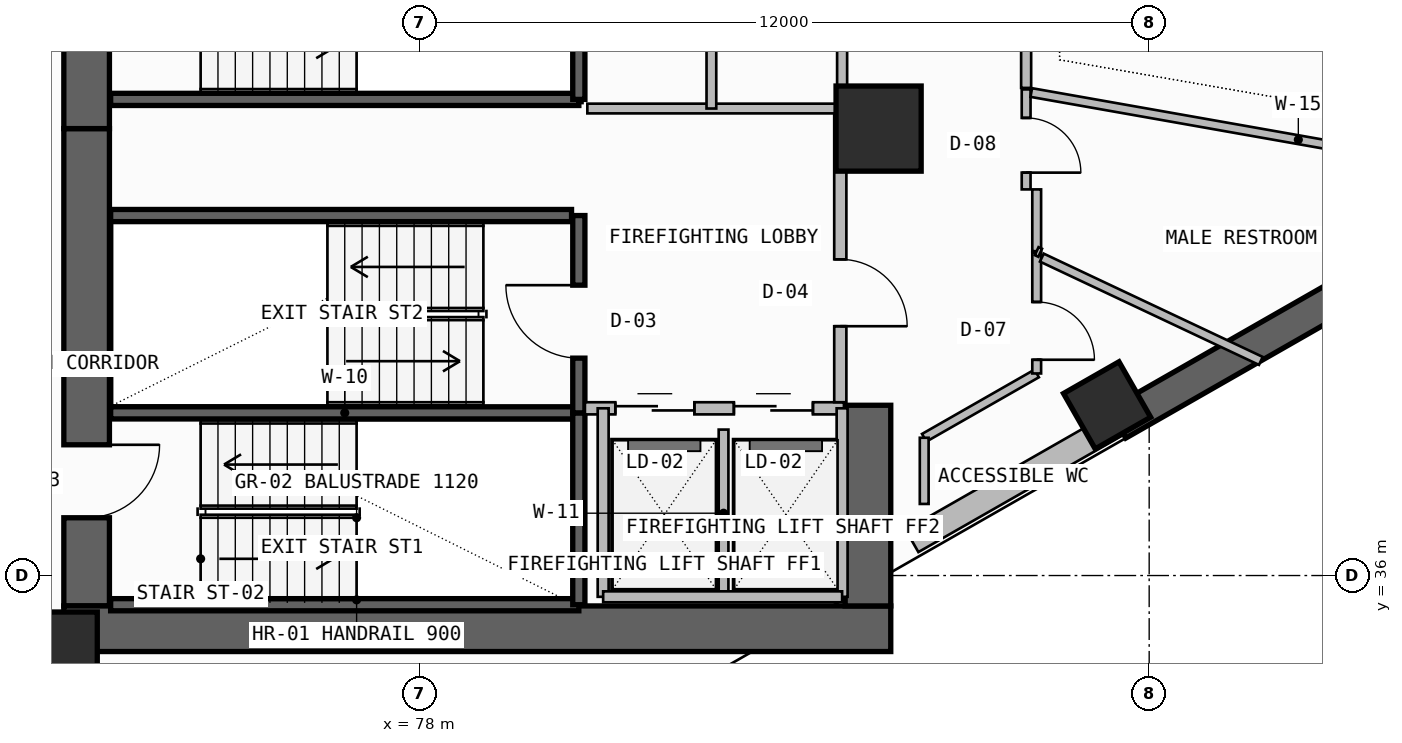
"""IFC4 building model, lengths in metres.
Left out: names, types, materials, properties, quantities, classifications, styles, units other than length and angle.
Written with IfcOpenShell. Run it as: python <this file> out.ifc"""

import sys

from ifc_helpers import new_model, si_unit, direction, frame, frame_2d, origin, origin_2d, place, context, subcontext, project, spatial, rectangle, extrude, element, fill, save


model = new_model("IFC4")
c1 = context("Model", 3, precision=1e-05, world=origin(), true_north=direction((0.0, 1.0)))
c2 = subcontext(c1, "Body", "Model", "MODEL_VIEW")
j1 = project(units=[si_unit("LENGTHUNIT", "METRE"), si_unit("PLANEANGLEUNIT", "RADIAN")], contexts=[c1])
p1 = place(None, origin())
s1 = spatial("IfcSite", under=j1, at=p1, CompositionType="ELEMENT")
p2 = place(p1, origin())
s2 = spatial("IfcBuilding", under=s1, at=p2, CompositionType="ELEMENT")
p3 = place(p2, frame((0.0, 0.0, 207.94)))
s3 = spatial("IfcBuildingStorey", under=s2, at=p3, CompositionType="ELEMENT", Elevation=207.94)
p4 = place(p3, frame((72.525, 35.5, -0.26), z_axis=(0.0, 0.0, 1.0), x_axis=(0.0, 1.0, 0.0)))
e1 = element("IfcWall", 1, at=p4, inside=s3, PredefinedType="SHEAR", context=c2, shape_type="SweptSolid", body=[
    extrude(rectangle(XDim=7.85, YDim=0.75, at=frame_2d((3.925, 0.0))), origin(), (0.0, 0.0, 1.0), 3.52),
])
p5 = place(p4, frame((1.45, 0.0, 0.26)))
e2 = element("IfcOpeningElement", 2, at=p5, cuts=e1, PredefinedType="OPENING", context=c2, shape_type="SweptSolid", body=[
    extrude(rectangle(XDim=1.2, YDim=2.2, at=frame_2d((0.6, 1.1))), frame((0.0, 0.385, 0.0), z_axis=(0.0, -1.0, 0.0), x_axis=(1.0, 0.0, 0.0)), (0.0, 0.0, 1.0), 0.77),
])
p6 = place(p3, frame((72.15, 35.125, -0.26), z_axis=(0.0, 0.0, 1.0), x_axis=(1.0, 0.0, 0.0)))
e3 = element("IfcWall", 3, at=p6, inside=s3, PredefinedType="SHEAR", context=c2, shape_type="SweptSolid", body=[
    extrude(rectangle(XDim=13.6, YDim=0.75, at=frame_2d((6.8, 0.0))), origin(), (0.0, 0.0, 1.0), 3.52),
])
p7 = place(p3, frame((85.375, 35.5, -0.26), z_axis=(0.0, 0.0, 1.0), x_axis=(0.0, 1.0, 0.0)))
e4 = element("IfcWall", 4, at=p7, inside=s3, PredefinedType="SHEAR", context=c2, shape_type="SweptSolid", body=[
    extrude(rectangle(XDim=3.3, YDim=0.75, at=frame_2d((1.65, 0.0))), origin(), (0.0, 0.0, 1.0), 3.52),
])
p8 = place(p3, frame((72.525, 43.35, -0.26), z_axis=(0.0, 0.0, 1.0), x_axis=(0.0, 1.0, 0.0)))
e5 = element("IfcWall", 5, at=p8, inside=s3, PredefinedType="SHEAR", context=c2, shape_type="SweptSolid", body=[
    extrude(rectangle(XDim=12.7, YDim=0.75, at=frame_2d((6.35, 0.0))), origin(), (0.0, 0.0, 1.0), 3.52),
])
p9 = place(p8, frame((1.35, 0.0, 0.26)))
e6 = element("IfcOpeningElement", 6, at=p9, cuts=e5, PredefinedType="OPENING", context=c2, shape_type="SweptSolid", body=[
    extrude(rectangle(XDim=1.2, YDim=2.2, at=frame_2d((0.6, 1.1))), frame((0.0, 0.385, 0.0), z_axis=(0.0, -1.0, 0.0), x_axis=(1.0, 0.0, 0.0)), (0.0, 0.0, 1.0), 0.77),
])
for number, where, z_axis, x_axis in (
    (7, (72.0, 34.7, 0.0), (0.0, 0.0, 1.0), (1.0, 0.0, 0.0)),
    (8, (85.55, 43.35, 0.0), (0.0, 0.0, 1.0), (1.0, 0.0, 0.0)),
):
    element("IfcColumn", number, at=place(p3, frame(where, z_axis=z_axis, x_axis=x_axis)), inside=s3, PredefinedType="COLUMN", context=c2, shape_type="SweptSolid", body=[
        extrude(rectangle(XDim=1.4, YDim=1.4, at=origin_2d()), origin(), (0.0, 0.0, 1.0), 3.52),
    ])
p10 = place(p3, frame((89.308, 38.799, 0.0), z_axis=(0.0, 0.0, 1.0), x_axis=(0.868198814489, 0.496216503675, 0.0)))
e9 = element("IfcColumn", 9, at=p10, inside=s3, PredefinedType="COLUMN", context=c2, shape_type="SweptSolid", body=[
    extrude(rectangle(XDim=1.05, YDim=1.05, at=origin_2d()), origin(), (0.0, 0.0, 1.0), 3.52),
])
p11 = place(p3, frame((86.1, 36.568, 0.0), z_axis=(0.0, 0.0, 1.0), x_axis=(0.868192956745, 0.496226752461, 0.0)))
e10 = element("IfcWall", 10, at=p11, inside=s3, PredefinedType="SOLIDWALL", context=c2, shape_type="SweptSolid", body=[
    extrude(rectangle(XDim=3.892, YDim=0.42, at=frame_2d((1.946, 0.0))), origin(), (0.0, 0.0, 1.0), 2.245),
])
p12 = place(p3, frame((89.479, 38.499, -0.26), z_axis=(0.0, 0.0, 1.0), x_axis=(0.868197136736, 0.496219439123, 0.0)))
e11 = element("IfcWall", 11, at=p12, inside=s3, PredefinedType="SHEAR", context=c2, shape_type="SweptSolid", body=[
    extrude(rectangle(XDim=17.636, YDim=0.55, at=frame_2d((8.818, 0.0))), origin(), (0.0, 0.0, 1.0), 3.52),
])
p13 = place(p12, frame((11.464, 0.0, 1.1)))
e12 = element("IfcOpeningElement", 12, at=p13, cuts=e11, PredefinedType="OPENING", context=c2, shape_type="SweptSolid", body=[
    extrude(rectangle(XDim=2.4, YDim=1.2, at=frame_2d((1.2, 0.6))), frame((0.0, 0.285, 0.0), z_axis=(0.0, -1.0, 0.0), x_axis=(1.0, 0.0, 0.0)), (0.0, 0.0, 1.0), 0.57),
])
for number, where, z_axis, x_axis in (
    (13, (72.92, 35.52, -0.26), (0.0, 0.0, 1.0), (1.0, 0.0, 0.0)),
    (14, (72.92, 38.675, -0.26), (0.0, 0.0, 1.0), (1.0, 0.0, 0.0)),
):
    element("IfcWall", number, at=place(p3, frame(where, z_axis=z_axis, x_axis=x_axis)), inside=s3, PredefinedType="SOLIDWALL", context=c2, shape_type="SweptSolid", body=[
        extrude(rectangle(XDim=7.7, YDim=0.2, at=frame_2d((3.85, 0.0))), origin(), (0.0, 0.0, 1.0), 3.52),
    ])
p14 = place(p3, frame((80.62, 35.52, -0.26), z_axis=(0.0, 0.0, 1.0), x_axis=(0.0, 1.0, 0.0)))
e15 = element("IfcWall", 15, at=p14, inside=s3, PredefinedType="SOLIDWALL", context=c2, shape_type="SweptSolid", body=[
    extrude(rectangle(XDim=3.155, YDim=0.2, at=frame_2d((1.578, 0.0))), origin(), (0.0, 0.0, 1.0), 3.52),
])
p15 = place(p3, frame((80.62, 38.675, -0.26), z_axis=(0.0, 0.0, 1.0), x_axis=(0.0, 1.0, 0.0)))
e16 = element("IfcWall", 16, at=p15, inside=s3, PredefinedType="SOLIDWALL", context=c2, shape_type="SweptSolid", body=[
    extrude(rectangle(XDim=3.245, YDim=0.2, at=frame_2d((1.623, 0.0))), origin(), (0.0, 0.0, 1.0), 3.52),
])
p16 = place(p15, frame((0.9, 0.0, 0.26)))
e17 = element("IfcOpeningElement", 17, at=p16, cuts=e16, PredefinedType="OPENING", context=c2, shape_type="SweptSolid", body=[
    extrude(rectangle(XDim=1.2, YDim=2.2, at=frame_2d((0.6, 1.1))), frame((0.0, 0.11, 0.0), z_axis=(0.0, -1.0, 0.0), x_axis=(1.0, 0.0, 0.0)), (0.0, 0.0, 1.0), 0.22),
])
p17 = place(p3, frame((80.72, 38.75, 0.0), z_axis=(0.0, 0.0, 1.0), x_axis=(1.0, 0.0, 0.0)))
e18 = element("IfcWall", 18, at=p17, inside=s3, PredefinedType="SOLIDWALL", context=c2, shape_type="SweptSolid", body=[
    extrude(rectangle(XDim=4.26, YDim=0.2, at=frame_2d((2.13, 0.0))), origin(), (0.0, 0.0, 1.0), 3.26),
])
p18 = place(p17, frame((0.5, 0.0, 0.0)))
e19 = element("IfcOpeningElement", 19, at=p18, cuts=e18, PredefinedType="OPENING", context=c2, shape_type="SweptSolid", body=[
    extrude(rectangle(XDim=1.3, YDim=2.3, at=frame_2d((0.65, 1.15))), frame((0.0, 0.11, 0.0), z_axis=(0.0, -1.0, 0.0), x_axis=(1.0, 0.0, 0.0)), (0.0, 0.0, 1.0), 0.22),
])
p19 = place(p17, frame((2.45, 0.0, 0.0)))
e20 = element("IfcOpeningElement", 20, at=p19, cuts=e18, PredefinedType="OPENING", context=c2, shape_type="SweptSolid", body=[
    extrude(rectangle(XDim=1.3, YDim=2.3, at=frame_2d((0.65, 1.15))), frame((0.0, 0.11, 0.0), z_axis=(0.0, -1.0, 0.0), x_axis=(1.0, 0.0, 0.0)), (0.0, 0.0, 1.0), 0.22),
])
p20 = place(p3, frame((83.0, 35.65, 0.0), z_axis=(0.0, 0.0, 1.0), x_axis=(0.0, 1.0, 0.0)))
e21 = element("IfcWall", 21, at=p20, inside=s3, PredefinedType="PLUMBINGWALL", context=c2, shape_type="SweptSolid", body=[
    extrude(rectangle(XDim=2.75, YDim=0.16, at=frame_2d((1.375, 0.0))), origin(), (0.0, 0.0, 1.0), 3.26),
])
for number, where, z_axis, x_axis in (
    (22, (84.95, 35.65, 0.0), (0.0, 0.0, 1.0), (0.0, 1.0, 0.0)),
    (23, (81.02, 35.65, 0.0), (0.0, 0.0, 1.0), (0.0, 1.0, 0.0)),
):
    element("IfcWall", number, at=place(p3, frame(where, z_axis=z_axis, x_axis=x_axis)), inside=s3, PredefinedType="SOLIDWALL", context=c2, shape_type="SweptSolid", body=[
        extrude(rectangle(XDim=3.1, YDim=0.18, at=frame_2d((1.55, 0.0))), origin(), (0.0, 0.0, 1.0), 3.26),
    ])
p21 = place(p3, frame((81.02, 35.65, 0.0), z_axis=(0.0, 0.0, 1.0), x_axis=(1.0, 0.0, 0.0)))
e24 = element("IfcWall", 24, at=p21, inside=s3, PredefinedType="SOLIDWALL", context=c2, shape_type="SweptSolid", body=[
    extrude(rectangle(XDim=3.93, YDim=0.18, at=frame_2d((1.965, 0.0))), origin(), (0.0, 0.0, 1.0), 3.26),
])
p22 = place(p3, frame((84.92, 38.85, 0.0), z_axis=(0.0, 0.0, 1.0), x_axis=(0.0, 1.0, 0.0)))
e25 = element("IfcWall", 25, at=p22, inside=s3, PredefinedType="SOLIDWALL", context=c2, shape_type="SweptSolid", body=[
    extrude(rectangle(XDim=4.83, YDim=0.2, at=frame_2d((2.415, 0.0))), origin(), (0.0, 0.0, 1.0), 3.26),
])
p23 = place(p22, frame((1.25, 0.0, 0.0)))
e26 = element("IfcOpeningElement", 26, at=p23, cuts=e25, PredefinedType="OPENING", context=c2, shape_type="SweptSolid", body=[
    extrude(rectangle(XDim=1.1, YDim=2.2, at=frame_2d((0.55, 1.1))), frame((0.0, 0.11, 0.0), z_axis=(0.0, -1.0, 0.0), x_axis=(1.0, 0.0, 0.0)), (0.0, 0.0, 1.0), 0.22),
])
p24 = place(p3, frame((72.92, 41.92, -0.26), z_axis=(0.0, 0.0, 1.0), x_axis=(1.0, 0.0, 0.0)))
e27 = element("IfcWall", 27, at=p24, inside=s3, PredefinedType="SOLIDWALL", context=c2, shape_type="SweptSolid", body=[
    extrude(rectangle(XDim=7.58, YDim=0.2, at=frame_2d((3.79, 0.0))), origin(), (0.0, 0.0, 1.0), 3.52),
])
p25 = place(p3, frame((72.92, 43.83, -0.26), z_axis=(0.0, 0.0, 1.0), x_axis=(1.0, 0.0, 0.0)))
e28 = element("IfcWall", 28, at=p25, inside=s3, PredefinedType="SOLIDWALL", context=c2, shape_type="SweptSolid", body=[
    extrude(rectangle(XDim=7.7, YDim=0.2, at=frame_2d((3.85, 0.0))), origin(), (0.0, 0.0, 1.0), 3.52),
])
p26 = place(p3, frame((80.62, 43.83, -0.26), z_axis=(0.0, 0.0, 1.0), x_axis=(0.0, 1.0, 0.0)))
e29 = element("IfcWall", 29, at=p26, inside=s3, PredefinedType="SOLIDWALL", context=c2, shape_type="SweptSolid", body=[
    extrude(rectangle(XDim=3.24, YDim=0.2, at=frame_2d((1.62, 0.0))), origin(), (0.0, 0.0, 1.0), 3.52),
])
p27 = place(p3, frame((84.95, 43.68, 0.0), z_axis=(0.0, 0.0, 1.0), x_axis=(0.0, 1.0, 0.0)))
e30 = element("IfcWall", 30, at=p27, inside=s3, PredefinedType="PLUMBINGWALL", context=c2, shape_type="SweptSolid", body=[
    extrude(rectangle(XDim=1.9, YDim=0.165, at=frame_2d((0.95, 0.0))), origin(), (0.0, 0.0, 1.0), 3.26),
])
p28 = place(p3, frame((80.76, 43.68, 0.0), z_axis=(0.0, 0.0, 1.0), x_axis=(1.0, 0.0, 0.0)))
e31 = element("IfcWall", 31, at=p28, inside=s3, PredefinedType="PLUMBINGWALL", context=c2, shape_type="SweptSolid", body=[
    extrude(rectangle(XDim=4.19, YDim=0.16, at=frame_2d((2.095, 0.0))), origin(), (0.0, 0.0, 1.0), 3.26),
])
p29 = place(p3, frame((82.8, 43.68, 0.0), z_axis=(0.0, 0.0, 1.0), x_axis=(0.0, 1.0, 0.0)))
e32 = element("IfcWall", 32, at=p29, inside=s3, PredefinedType="PLUMBINGWALL", context=c2, shape_type="SweptSolid", body=[
    extrude(rectangle(XDim=1.9, YDim=0.16, at=frame_2d((0.95, 0.0))), origin(), (0.0, 0.0, 1.0), 3.26),
])
p30 = place(p3, frame((86.3, 38.266, 0.0), z_axis=(0.0, 0.0, 1.0), x_axis=(0.868179674817, 0.496249989657, 0.0)))
e33 = element("IfcWall", 33, at=p30, inside=s3, PredefinedType="PARTITIONING", context=c2, shape_type="SweptSolid", body=[
    extrude(rectangle(XDim=2.131, YDim=0.145, at=frame_2d((1.065, 0.0))), origin(), (0.0, 0.0, 1.0), 3.26),
])
p31 = place(p3, frame((88.15, 39.323, 0.0), z_axis=(0.0, 0.0, 1.0), x_axis=(0.0, 1.0, 0.0)))
e34 = element("IfcWall", 34, at=p31, inside=s3, PredefinedType="PARTITIONING", context=c2, shape_type="SweptSolid", body=[
    extrude(rectangle(XDim=1.985, YDim=0.145, at=frame_2d((0.992, 0.0))), origin(), (0.0, 0.0, 1.0), 2.745),
])
p32 = place(p31, frame((0.225, 0.0, 0.0)))
e35 = element("IfcOpeningElement", 35, at=p32, cuts=e34, PredefinedType="OPENING", context=c2, shape_type="SweptSolid", body=[
    extrude(rectangle(XDim=0.95, YDim=2.15, at=frame_2d((0.475, 1.075))), frame((0.0, 0.083, 0.0), z_axis=(0.0, -1.0, 0.0), x_axis=(1.0, 0.0, 0.0)), (0.0, 0.0, 1.0), 0.165),
])
p33 = place(p3, frame((88.235, 41.228, 0.0), z_axis=(0.0, 0.0, 1.0), x_axis=(0.904454353527, -0.426570419023, 0.0)))
e36 = element("IfcWall", 36, at=p33, inside=s3, PredefinedType="PARTITIONING", context=c2, shape_type="SweptSolid", body=[
    extrude(rectangle(XDim=3.982, YDim=0.145, at=frame_2d((1.991, 0.0))), origin(), (0.0, 0.0, 1.0), 2.245),
])
p34 = place(p3, frame((87.976, 42.35, 0.0), z_axis=(0.0, 0.0, 1.0), x_axis=(0.0, 1.0, 0.0)))
e37 = element("IfcWall", 37, at=p34, inside=s3, PredefinedType="PARTITIONING", context=c2, shape_type="SweptSolid", body=[
    extrude(rectangle(XDim=1.644, YDim=0.145, at=frame_2d((0.822, 0.0))), origin(), (0.0, 0.0, 1.0), 2.745),
])
p35 = place(p34, frame((0.276, 0.0, 0.0)))
e38 = element("IfcOpeningElement", 38, at=p35, cuts=e37, PredefinedType="OPENING", context=c2, shape_type="SweptSolid", body=[
    extrude(rectangle(XDim=0.9, YDim=2.1, at=frame_2d((0.45, 1.05))), frame((0.0, 0.083, 0.0), z_axis=(0.0, -1.0, 0.0), x_axis=(1.0, 0.0, 0.0)), (0.0, 0.0, 1.0), 0.165),
])
p36 = place(p3, frame((88.15, 41.334, 0.0), z_axis=(0.0, 0.0, 1.0), x_axis=(0.0, 1.0, 0.0)))
e39 = element("IfcWall", 39, at=p36, inside=s3, PredefinedType="PARTITIONING", context=c2, shape_type="SweptSolid", body=[
    extrude(rectangle(XDim=1.016, YDim=0.145, at=frame_2d((0.508, 0.0))), origin(), (0.0, 0.0, 1.0), 2.845),
])
p37 = place(p3, frame((88.208, 41.308, 0.0), z_axis=(0.0, 0.0, 1.0), x_axis=(-0.909307898958, 0.41612395376, 0.0)))
e40 = element("IfcWall", 40, at=p37, inside=s3, PredefinedType="PARTITIONING", context=c2, shape_type="SweptSolid", body=[
    extrude(rectangle(XDim=0.063, YDim=0.145, at=frame_2d((0.032, 0.0))), origin(), (0.0, 0.0, 1.0), 3.26),
])
p38 = place(p3, frame((88.061, 43.943, 0.0), z_axis=(0.0, 0.0, 1.0), x_axis=(0.98476674656, -0.173880576456, 0.0)))
e41 = element("IfcWall", 41, at=p38, inside=s3, PredefinedType="PARTITIONING", context=c2, shape_type="SweptSolid", body=[
    extrude(rectangle(XDim=8.92, YDim=0.145, at=frame_2d((4.46, 0.0))), origin(), (0.0, 0.0, 1.0), 2.245),
])
p39 = place(p3, frame((87.976, 44.019, 0.0), z_axis=(0.0, 0.0, 1.0), x_axis=(0.0, 1.0, 0.0)))
e42 = element("IfcWall", 42, at=p39, inside=s3, PredefinedType="PARTITIONING", context=c2, shape_type="SweptSolid", body=[
    extrude(rectangle(XDim=1.631, YDim=0.165, at=frame_2d((0.815, 0.0))), origin(), (0.0, 0.0, 1.0), 2.745),
])
p40 = place(p3, frame((86.3, 37.177, 0.0), z_axis=(0.0, 0.0, 1.0), x_axis=(0.0, 1.0, 0.0)))
e43 = element("IfcWall", 43, at=p40, inside=s3, PredefinedType="PARTITIONING", context=c2, shape_type="SweptSolid", body=[
    extrude(rectangle(XDim=1.088, YDim=0.145, at=frame_2d((0.544, 0.0))), origin(), (0.0, 0.0, 1.0), 3.26),
])
p41 = place(p5, frame((1.2, 0.0, 0.0), z_axis=(0.0, 0.0, 1.0), x_axis=(-1.0, 0.0, 0.0)))
e44 = element("IfcDoor", 44, at=p41, inside=s3, OperationType="SINGLE_SWING_LEFT", PredefinedType="USERDEFINED", context=c2, shape_type="SweptSolid", body=[
    extrude(rectangle(XDim=1.2, YDim=2.2, at=frame_2d((0.6, 1.1))), frame((0.0, 0.025, 0.0), z_axis=(0.0, -1.0, 0.0), x_axis=(1.0, 0.0, 0.0)), (0.0, 0.0, 1.0), 0.05),
])
fill(e2, e44)
p42 = place(p16, origin())
e45 = element("IfcDoor", 45, at=p42, inside=s3, OperationType="SINGLE_SWING_RIGHT", PredefinedType="USERDEFINED", context=c2, shape_type="SweptSolid", body=[
    extrude(rectangle(XDim=1.2, YDim=2.2, at=frame_2d((0.6, 1.1))), frame((0.0, 0.025, 0.0), z_axis=(0.0, -1.0, 0.0), x_axis=(1.0, 0.0, 0.0)), (0.0, 0.0, 1.0), 0.05),
])
fill(e17, e45)
p43 = place(p18, origin())
e46 = element("IfcDoor", 46, at=p43, inside=s3, OperationType="DOUBLE_DOOR_SLIDING", PredefinedType="DOOR", context=c2, shape_type="SweptSolid", body=[
    extrude(rectangle(XDim=1.3, YDim=2.3, at=frame_2d((0.65, 1.15))), frame((0.0, 0.025, 0.0), z_axis=(0.0, -1.0, 0.0), x_axis=(1.0, 0.0, 0.0)), (0.0, 0.0, 1.0), 0.05),
])
fill(e19, e46)
p44 = place(p19, origin())
e47 = element("IfcDoor", 47, at=p44, inside=s3, OperationType="DOUBLE_DOOR_SLIDING", PredefinedType="DOOR", context=c2, shape_type="SweptSolid", body=[
    extrude(rectangle(XDim=1.3, YDim=2.3, at=frame_2d((0.65, 1.15))), frame((0.0, 0.025, 0.0), z_axis=(0.0, -1.0, 0.0), x_axis=(1.0, 0.0, 0.0)), (0.0, 0.0, 1.0), 0.05),
])
fill(e20, e47)
p45 = place(p23, frame((1.1, 0.0, 0.0), z_axis=(0.0, 0.0, 1.0), x_axis=(-1.0, 0.0, 0.0)))
e48 = element("IfcDoor", 48, at=p45, inside=s3, OperationType="SINGLE_SWING_RIGHT", PredefinedType="DOOR", context=c2, shape_type="SweptSolid", body=[
    extrude(rectangle(XDim=1.1, YDim=2.2, at=frame_2d((0.55, 1.1))), frame((0.0, 0.025, 0.0), z_axis=(0.0, -1.0, 0.0), x_axis=(1.0, 0.0, 0.0)), (0.0, 0.0, 1.0), 0.05),
])
fill(e26, e48)
p46 = place(p32, frame((0.95, 0.0, 0.0), z_axis=(0.0, 0.0, 1.0), x_axis=(-1.0, 0.0, 0.0)))
e49 = element("IfcDoor", 49, at=p46, inside=s3, OperationType="SINGLE_SWING_RIGHT", PredefinedType="DOOR", context=c2, shape_type="SweptSolid", body=[
    extrude(rectangle(XDim=0.95, YDim=2.15, at=frame_2d((0.475, 1.075))), frame((0.0, 0.025, 0.0), z_axis=(0.0, -1.0, 0.0), x_axis=(1.0, 0.0, 0.0)), (0.0, 0.0, 1.0), 0.05),
])
fill(e35, e49)
p47 = place(p35, frame((0.9, 0.0, 0.0), z_axis=(0.0, 0.0, 1.0), x_axis=(-1.0, 0.0, 0.0)))
e50 = element("IfcDoor", 50, at=p47, inside=s3, OperationType="SINGLE_SWING_RIGHT", PredefinedType="DOOR", context=c2, shape_type="SweptSolid", body=[
    extrude(rectangle(XDim=0.9, YDim=2.1, at=frame_2d((0.45, 1.05))), frame((0.0, 0.025, 0.0), z_axis=(0.0, -1.0, 0.0), x_axis=(1.0, 0.0, 0.0)), (0.0, 0.0, 1.0), 0.05),
])
fill(e38, e50)
save(model, sys.argv[1])
